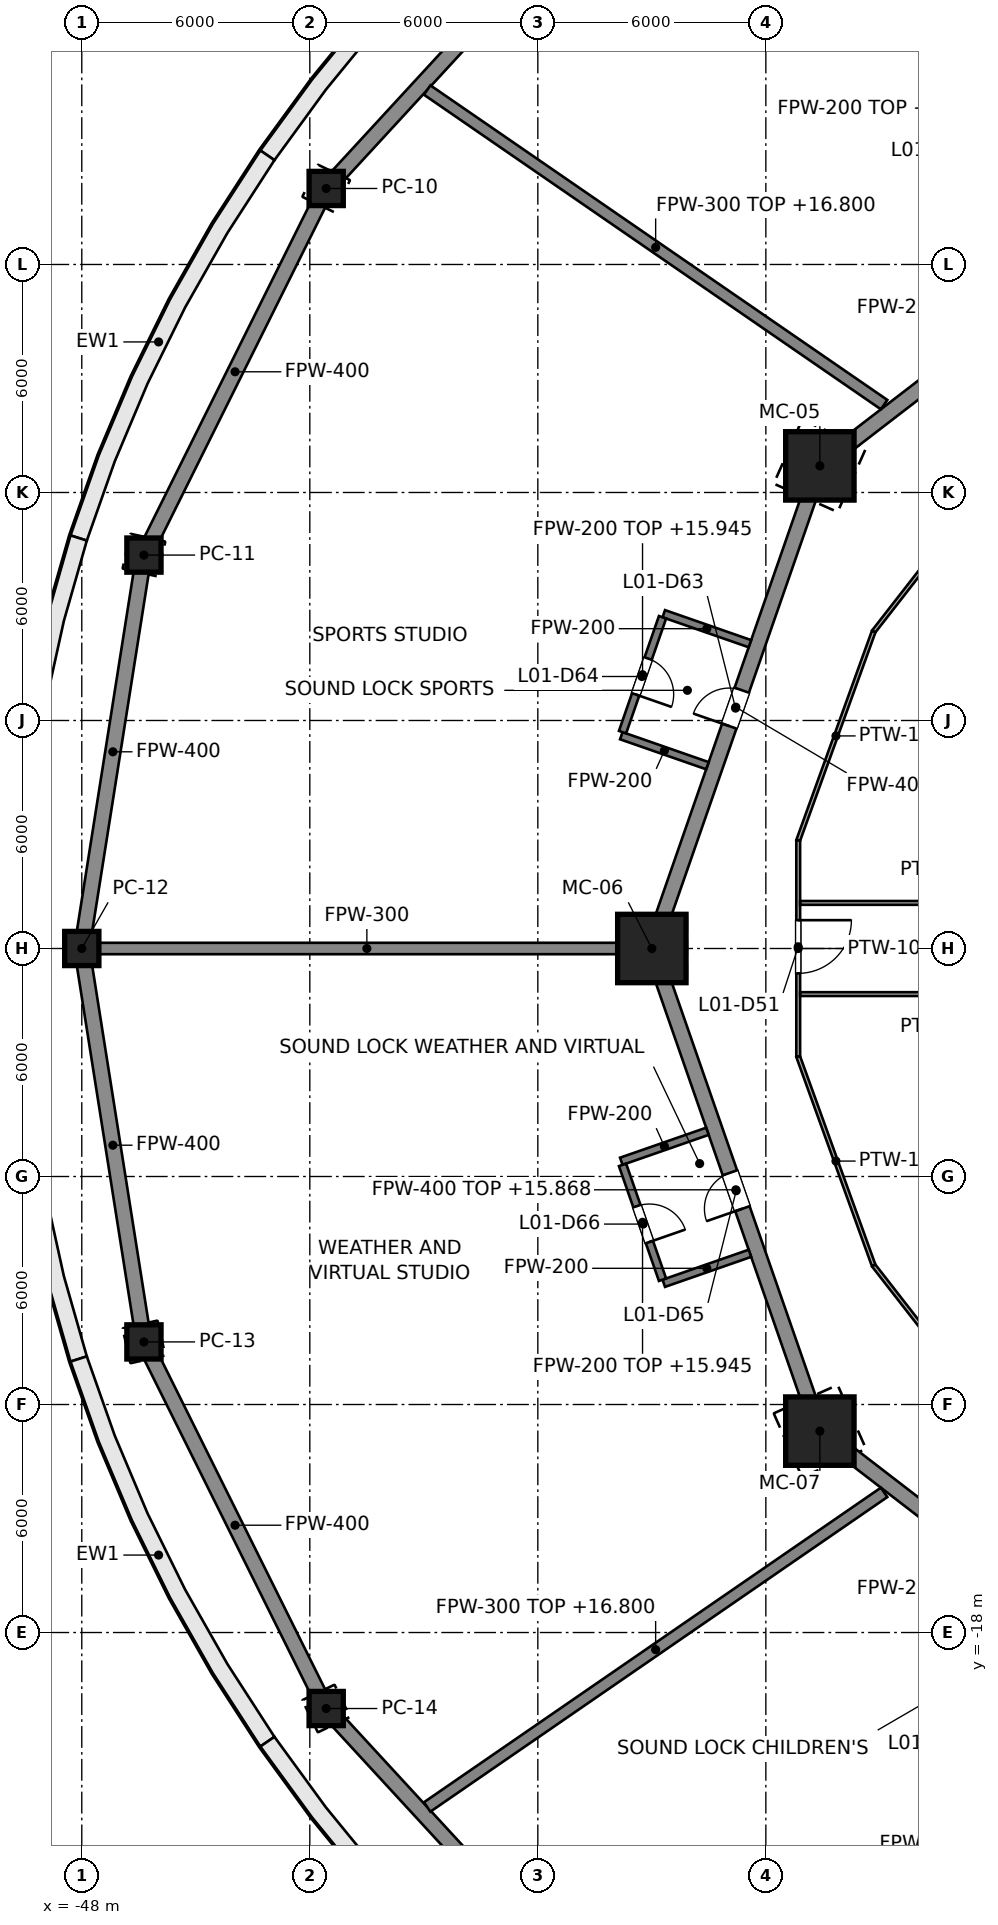
"""IFC4 building model, lengths in metres.
Left out: names, types, materials, properties, quantities, classifications, styles, units other than length and angle.
Written with IfcOpenShell. Run it as: python <this file> out.ifc"""

import sys

from ifc_helpers import new_model, si_unit, direction, frame, frame_2d, origin, origin_2d, place, context, subcontext, project, spatial, polyline, rectangle, hollow_rectangle, outline, extrude, element, fill, save


model = new_model("IFC4")
c1 = context("Model", 3, precision=1e-05, world=origin(), true_north=direction((0.0, 1.0)))
c2 = subcontext(c1, "Body", "Model", "MODEL_VIEW")
j1 = project(units=[si_unit("LENGTHUNIT", "METRE"), si_unit("PLANEANGLEUNIT", "RADIAN")], contexts=[c1])
p1 = place(None, origin())
s1 = spatial("IfcSite", under=j1, at=p1, CompositionType="ELEMENT")
p2 = place(p1, origin())
s2 = spatial("IfcBuilding", under=s1, at=p2, CompositionType="ELEMENT")
p3 = place(p2, frame((0.0, 0.0, 8.0)))
s3 = spatial("IfcBuildingStorey", under=s2, at=p3, CompositionType="ELEMENT", Elevation=8.0)
for number, where, z_axis, x_axis in (
    (1, (-28.579, 12.7, 0.0), (0.0, 0.0, 1.0), (-0.914, 0.406, 0.0)),
    (2, (-33.0, 0.0, 0.0), (0.0, 0.0, 1.0), (-1.0, 0.0, 0.0)),
    (3, (-28.579, -12.7, 0.0), (0.0, 0.0, 1.0), (-0.914, -0.406, 0.0)),
):
    element("IfcColumn", number, at=place(p3, frame(where, z_axis=z_axis, x_axis=x_axis)), inside=s3, PredefinedType="COLUMN", context=c2, shape_type="SweptSolid", body=[
        extrude(hollow_rectangle(XDim=1.8, YDim=1.8, WallThickness=0.08, at=origin_2d()), origin(), (0.0, 0.0, 1.0), 9.0),
    ])
for number, where, z_axis, x_axis in (
    (4, (-41.569, 20.0, 0.0), (0.0, 0.0, 1.0), (-0.901, 0.434, 0.0)),
    (5, (-46.365, 10.353, 0.0), (0.0, 0.0, 1.0), (-0.976, 0.218, 0.0)),
    (6, (-48.0, 0.0, 0.0), (0.0, 0.0, 1.0), (-1.0, 0.0, 0.0)),
    (7, (-46.365, -10.353, 0.0), (0.0, 0.0, 1.0), (-0.976, -0.218, 0.0)),
    (8, (-41.569, -20.0, 0.0), (0.0, 0.0, 1.0), (-0.901, -0.434, 0.0)),
):
    element("IfcColumn", number, at=place(p3, frame(where, z_axis=z_axis, x_axis=x_axis)), inside=s3, PredefinedType="COLUMN", context=c2, shape_type="SweptSolid", body=[
        extrude(hollow_rectangle(XDim=0.9, YDim=0.9, WallThickness=0.04, at=origin_2d()), origin(), (0.0, 0.0, 1.0), 9.0),
    ])
p4 = place(p3, origin())
e9 = element("IfcWall", 9, at=p4, inside=s3, PredefinedType="SOLIDWALL", context=c2, shape_type="SweptSolid", body=[
    extrude(outline(polyline([(-35.355, 29.698), (-37.157, 28.104), (-38.857, 26.431), (-40.451, 24.687), (-41.934, 22.875), (-43.301, 21.0), (-42.93, 20.745), (-41.577, 22.6), (-40.11, 24.393), (-38.533, 26.119), (-36.85, 27.774), (-35.066, 29.354), (-35.355, 29.698)])), origin(), (0.0, 0.0, 1.0), 8.8),
])
e10 = element("IfcWall", 10, at=p4, inside=s3, PredefinedType="SOLIDWALL", context=c2, shape_type="SweptSolid", body=[
    extrude(outline(polyline([(-43.301, 21.0), (-44.55, 19.068), (-45.677, 17.083), (-46.679, 15.052), (-47.553, 12.979), (-48.296, 10.87), (-47.868, 10.734), (-47.133, 12.816), (-46.27, 14.865), (-45.28, 16.872), (-44.166, 18.834), (-42.93, 20.745), (-43.301, 21.0)])), origin(), (0.0, 0.0, 1.0), 8.8),
])
e11 = element("IfcWall", 11, at=p4, inside=s3, PredefinedType="SOLIDWALL", context=c2, shape_type="SweptSolid", body=[
    extrude(outline(polyline([(-48.296, 10.87), (-48.907, 8.732), (-49.385, 6.57), (-49.726, 4.39), (-49.931, 2.198), (-50.0, 0.0), (-49.55, 0.0), (-49.482, 2.17), (-49.28, 4.334), (-48.942, 6.487), (-48.471, 8.622), (-47.868, 10.734), (-48.296, 10.87)])), origin(), (0.0, 0.0, 1.0), 8.8),
])
e12 = element("IfcWall", 12, at=p4, inside=s3, PredefinedType="SOLIDWALL", context=c2, shape_type="SweptSolid", body=[
    extrude(outline(polyline([(-50.0, 0.0), (-49.931, -2.198), (-49.726, -4.39), (-49.385, -6.57), (-48.907, -8.732), (-48.296, -10.87), (-47.868, -10.734), (-48.471, -8.622), (-48.942, -6.487), (-49.28, -4.334), (-49.482, -2.17), (-49.55, 0.0), (-50.0, 0.0)])), origin(), (0.0, 0.0, 1.0), 8.8),
])
e13 = element("IfcWall", 13, at=p4, inside=s3, PredefinedType="SOLIDWALL", context=c2, shape_type="SweptSolid", body=[
    extrude(outline(polyline([(-48.296, -10.87), (-47.553, -12.979), (-46.679, -15.052), (-45.677, -17.083), (-44.55, -19.068), (-43.301, -21.0), (-42.93, -20.745), (-44.166, -18.834), (-45.28, -16.872), (-46.27, -14.865), (-47.133, -12.816), (-47.868, -10.734), (-48.296, -10.87)])), origin(), (0.0, 0.0, 1.0), 8.8),
])
e14 = element("IfcWall", 14, at=p4, inside=s3, PredefinedType="SOLIDWALL", context=c2, shape_type="SweptSolid", body=[
    extrude(outline(polyline([(-43.301, -21.0), (-41.934, -22.875), (-40.451, -24.687), (-38.857, -26.431), (-37.157, -28.104), (-35.355, -29.698), (-35.066, -29.354), (-36.85, -27.774), (-38.533, -26.119), (-40.11, -24.393), (-41.577, -22.6), (-42.93, -20.745), (-43.301, -21.0)])), origin(), (0.0, 0.0, 1.0), 8.8),
])
p5 = place(p3, frame((-33.941, 28.284, 0.0), z_axis=(0.0, 0.0, 1.0), x_axis=(-0.67736833065, -0.735644033914, 0.0)))
e15 = element("IfcWall", 15, at=p5, inside=s3, PredefinedType="PARTITIONING", context=c2, shape_type="SweptSolid", body=[
    extrude(rectangle(XDim=11.261, YDim=0.4, at=frame_2d((5.631, 0.0))), origin(), (0.0, 0.0, 1.0), 7.877),
])
p6 = place(p3, frame((-41.569, 20.0, 0.0), z_axis=(0.0, 0.0, 1.0), x_axis=(-0.445118441463, -0.895471704226, 0.0)))
e16 = element("IfcWall", 16, at=p6, inside=s3, PredefinedType="PARTITIONING", context=c2, shape_type="SweptSolid", body=[
    extrude(rectangle(XDim=10.773, YDim=0.4, at=frame_2d((5.387, 0.0))), origin(), (0.0, 0.0, 1.0), 7.877),
])
for number, where, z_axis, x_axis in (
    (17, (-46.365, 10.353, 0.0), (0.0, 0.0, 1.0), (-0.156, -0.988, 0.0)),
    (18, (-48.0, 0.0, 0.0), (0.0, 0.0, 1.0), (0.156, -0.988, 0.0)),
):
    element("IfcWall", number, at=place(p3, frame(where, z_axis=z_axis, x_axis=x_axis)), inside=s3, PredefinedType="PARTITIONING", context=c2, shape_type="SweptSolid", body=[
        extrude(rectangle(XDim=10.481, YDim=0.4, at=frame_2d((5.241, 0.0))), origin(), (0.0, 0.0, 1.0), 7.877),
    ])
p7 = place(p3, frame((-46.365, -10.353, 0.0), z_axis=(0.0, 0.0, 1.0), x_axis=(0.445118441463, -0.895471704226, 0.0)))
e19 = element("IfcWall", 19, at=p7, inside=s3, PredefinedType="PARTITIONING", context=c2, shape_type="SweptSolid", body=[
    extrude(rectangle(XDim=10.773, YDim=0.4, at=frame_2d((5.387, 0.0))), origin(), (0.0, 0.0, 1.0), 7.877),
])
p8 = place(p3, frame((-41.569, -20.0, 0.0), z_axis=(0.0, 0.0, 1.0), x_axis=(0.67736833065, -0.735644033914, 0.0)))
e20 = element("IfcWall", 20, at=p8, inside=s3, PredefinedType="PARTITIONING", context=c2, shape_type="SweptSolid", body=[
    extrude(rectangle(XDim=11.261, YDim=0.4, at=frame_2d((5.631, 0.0))), origin(), (0.0, 0.0, 1.0), 7.877),
])
p9 = place(p3, frame((-16.5, 21.997, 0.0), z_axis=(0.0, 0.0, 1.0), x_axis=(-0.792443539308, -0.609945273782, 0.0)))
e21 = element("IfcWall", 21, at=p9, inside=s3, PredefinedType="PARTITIONING", context=c2, shape_type="SweptSolid", body=[
    extrude(rectangle(XDim=15.242, YDim=0.4, at=frame_2d((7.621, 0.0))), origin(), (0.0, 0.0, 1.0), 7.868),
])
p10 = place(p9, frame((7.15, 0.0, 0.0)))
e22 = element("IfcOpeningElement", 22, at=p10, cuts=e21, PredefinedType="OPENING", context=c2, shape_type="SweptSolid", body=[
    extrude(rectangle(XDim=1.0, YDim=2.1, at=frame_2d((0.5, 1.05))), frame((0.0, 0.2, 0.0), z_axis=(0.0, -1.0, 0.0), x_axis=(1.0, 0.0, 0.0)), (0.0, 0.0, 1.0), 0.4),
])
p11 = place(p3, frame((-28.579, 12.7, 0.0), z_axis=(0.0, 0.0, 1.0), x_axis=(-0.328770590399, -0.944409815117, 0.0)))
e23 = element("IfcWall", 23, at=p11, inside=s3, PredefinedType="PARTITIONING", context=c2, shape_type="SweptSolid", body=[
    extrude(rectangle(XDim=13.448, YDim=0.4, at=frame_2d((6.724, 0.0))), origin(), (0.0, 0.0, 1.0), 7.868),
])
p12 = place(p11, frame((6.25, 0.0, 0.0)))
e24 = element("IfcOpeningElement", 24, at=p12, cuts=e23, PredefinedType="OPENING", context=c2, shape_type="SweptSolid", body=[
    extrude(rectangle(XDim=1.0, YDim=2.1, at=frame_2d((0.5, 1.05))), frame((0.0, 0.2, 0.0), z_axis=(0.0, -1.0, 0.0), x_axis=(1.0, 0.0, 0.0)), (0.0, 0.0, 1.0), 0.4),
])
p13 = place(p3, frame((-33.0, 0.0, 0.0), z_axis=(0.0, 0.0, 1.0), x_axis=(0.328770590399, -0.944409815117, 0.0)))
e25 = element("IfcWall", 25, at=p13, inside=s3, PredefinedType="PARTITIONING", context=c2, shape_type="SweptSolid", body=[
    extrude(rectangle(XDim=13.448, YDim=0.4, at=frame_2d((6.724, 0.0))), origin(), (0.0, 0.0, 1.0), 7.868),
])
p14 = place(p13, frame((6.25, 0.0, 0.0)))
e26 = element("IfcOpeningElement", 26, at=p14, cuts=e25, PredefinedType="OPENING", context=c2, shape_type="SweptSolid", body=[
    extrude(rectangle(XDim=1.0, YDim=2.1, at=frame_2d((0.5, 1.05))), frame((0.0, 0.2, 0.0), z_axis=(0.0, -1.0, 0.0), x_axis=(1.0, 0.0, 0.0)), (0.0, 0.0, 1.0), 0.4),
])
p15 = place(p3, frame((-28.579, -12.7, 0.0), z_axis=(0.0, 0.0, 1.0), x_axis=(0.792443539308, -0.609945273782, 0.0)))
e27 = element("IfcWall", 27, at=p15, inside=s3, PredefinedType="PARTITIONING", context=c2, shape_type="SweptSolid", body=[
    extrude(rectangle(XDim=15.242, YDim=0.4, at=frame_2d((7.621, 0.0))), origin(), (0.0, 0.0, 1.0), 7.868),
])
p16 = place(p15, frame((7.15, 0.0, 0.0)))
e28 = element("IfcOpeningElement", 28, at=p16, cuts=e27, PredefinedType="OPENING", context=c2, shape_type="SweptSolid", body=[
    extrude(rectangle(XDim=1.0, YDim=2.1, at=frame_2d((0.5, 1.05))), frame((0.0, 0.2, 0.0), z_axis=(0.0, -1.0, 0.0), x_axis=(1.0, 0.0, 0.0)), (0.0, 0.0, 1.0), 0.4),
])
p17 = place(p3, frame((-23.325, 13.271, 0.0), z_axis=(0.0, 0.0, 1.0), x_axis=(-0.614354540541, -0.78903009988, 0.0)))
e29 = element("IfcWall", 29, at=p17, inside=s3, PredefinedType="PARTITIONING", context=c2, shape_type="SweptSolid", body=[
    extrude(rectangle(XDim=6.246, YDim=0.1, at=frame_2d((3.123, 0.0))), origin(), (0.0, 0.0, 1.0), 7.945),
])
p18 = place(p3, frame((-27.162, 8.343, 0.0), z_axis=(0.0, 0.0, 1.0), x_axis=(-0.339837423604, -0.940484197378, 0.0)))
e30 = element("IfcWall", 30, at=p18, inside=s3, PredefinedType="PARTITIONING", context=c2, shape_type="SweptSolid", body=[
    extrude(rectangle(XDim=5.845, YDim=0.1, at=frame_2d((2.922, 0.0))), origin(), (0.0, 0.0, 1.0), 7.877),
])
p19 = place(p3, frame((-29.148, 2.845, 0.0), z_axis=(0.0, 0.0, 1.0), x_axis=(0.0, -1.0, 0.0)))
e31 = element("IfcWall", 31, at=p19, inside=s3, PredefinedType="PARTITIONING", context=c2, shape_type="SweptSolid", body=[
    extrude(rectangle(XDim=5.691, YDim=0.1, at=frame_2d((2.845, 0.0))), origin(), (0.0, 0.0, 1.0), 7.877),
])
p20 = place(p19, frame((2.1, 0.0, 0.0)))
e32 = element("IfcOpeningElement", 32, at=p20, cuts=e31, PredefinedType="OPENING", context=c2, shape_type="SweptSolid", body=[
    extrude(rectangle(XDim=1.4, YDim=2.1, at=frame_2d((0.7, 1.05))), frame((0.0, 0.05, 0.0), z_axis=(0.0, -1.0, 0.0), x_axis=(1.0, 0.0, 0.0)), (0.0, 0.0, 1.0), 0.1),
])
p21 = place(p3, frame((-29.148, -2.845, 0.0), z_axis=(0.0, 0.0, 1.0), x_axis=(0.339837423604, -0.940484197378, 0.0)))
e33 = element("IfcWall", 33, at=p21, inside=s3, PredefinedType="PARTITIONING", context=c2, shape_type="SweptSolid", body=[
    extrude(rectangle(XDim=5.845, YDim=0.1, at=frame_2d((2.922, 0.0))), origin(), (0.0, 0.0, 1.0), 7.877),
])
p22 = place(p3, frame((-27.162, -8.343, 0.0), z_axis=(0.0, 0.0, 1.0), x_axis=(0.614354540541, -0.78903009988, 0.0)))
e34 = element("IfcWall", 34, at=p22, inside=s3, PredefinedType="PARTITIONING", context=c2, shape_type="SweptSolid", body=[
    extrude(rectangle(XDim=6.246, YDim=0.1, at=frame_2d((3.123, 0.0))), origin(), (0.0, 0.0, 1.0), 7.945),
])
for number, where, z_axis, x_axis in (
    (35, (-18.05, -1.2, 0.0), (0.0, 0.0, 1.0), (-1.0, 0.0, 0.0)),
    (36, (-18.05, 1.2, 0.0), (0.0, 0.0, 1.0), (-1.0, 0.0, 0.0)),
):
    element("IfcWall", number, at=place(p3, frame(where, z_axis=z_axis, x_axis=x_axis)), inside=s3, PredefinedType="PARTITIONING", context=c2, shape_type="SweptSolid", body=[
        extrude(rectangle(XDim=11.048, YDim=0.1, at=frame_2d((5.524, 0.0))), origin(), (0.0, 0.0, 1.0), 8.8),
    ])
p23 = place(p3, frame((-26.888, 14.312, 0.0), z_axis=(0.0, 0.0, 1.0), x_axis=(-0.823646474485, 0.567103592889, 0.0)))
e37 = element("IfcWall", 37, at=p23, inside=s3, PredefinedType="PARTITIONING", context=c2, shape_type="SweptSolid", body=[
    extrude(rectangle(XDim=14.598, YDim=0.3, at=frame_2d((7.299, 0.0))), origin(), (0.0, 0.0, 1.0), 8.8),
])
p24 = place(p3, frame((-33.2, 0.0, 0.0), z_axis=(0.0, 0.0, 1.0), x_axis=(-1.0, 0.0, 0.0)))
e38 = element("IfcWall", 38, at=p24, inside=s3, PredefinedType="PARTITIONING", context=c2, shape_type="SweptSolid", body=[
    extrude(rectangle(XDim=14.598, YDim=0.3, at=frame_2d((7.299, 0.0))), origin(), (0.0, 0.0, 1.0), 8.026),
])
p25 = place(p3, frame((-26.888, -14.312, 0.0), z_axis=(0.0, 0.0, 1.0), x_axis=(-0.823646474485, -0.567103592889, 0.0)))
e39 = element("IfcWall", 39, at=p25, inside=s3, PredefinedType="PARTITIONING", context=c2, shape_type="SweptSolid", body=[
    extrude(rectangle(XDim=14.598, YDim=0.3, at=frame_2d((7.299, 0.0))), origin(), (0.0, 0.0, 1.0), 8.8),
])
for number, where, z_axis, x_axis in (
    (40, (-30.419, 8.021, 0.0), (0.0, 0.0, 1.0), (-0.944, 0.329, 0.0)),
    (41, (-31.537, 4.81, 0.0), (0.0, 0.0, 1.0), (-0.944, 0.329, 0.0)),
):
    element("IfcWall", number, at=place(p3, frame(where, z_axis=z_axis, x_axis=x_axis)), inside=s3, PredefinedType="PARTITIONING", context=c2, shape_type="SweptSolid", body=[
        extrude(rectangle(XDim=2.4, YDim=0.2, at=frame_2d((1.2, 0.0))), origin(), (0.0, 0.0, 1.0), 8.8),
    ])
p26 = place(p3, frame((-32.719, 8.716, 0.0), z_axis=(0.0, 0.0, 1.0), x_axis=(-0.328742544754, -0.944419577978, 0.0)))
e42 = element("IfcWall", 42, at=p26, inside=s3, PredefinedType="PARTITIONING", context=c2, shape_type="SweptSolid", body=[
    extrude(rectangle(XDim=3.2, YDim=0.2, at=frame_2d((1.6, 0.0))), origin(), (0.0, 0.0, 1.0), 7.945),
])
p27 = place(p26, frame((1.15, 0.0, 0.0)))
e43 = element("IfcOpeningElement", 43, at=p27, cuts=e42, PredefinedType="OPENING", context=c2, shape_type="SweptSolid", body=[
    extrude(rectangle(XDim=1.0, YDim=2.1, at=frame_2d((0.5, 1.05))), frame((0.0, 0.1, 0.0), z_axis=(0.0, -1.0, 0.0), x_axis=(1.0, 0.0, 0.0)), (0.0, 0.0, 1.0), 0.2),
])
for number, where, z_axis, x_axis in (
    (44, (-31.537, -4.81, 0.0), (0.0, 0.0, 1.0), (-0.944, -0.329, 0.0)),
    (45, (-30.419, -8.021, 0.0), (0.0, 0.0, 1.0), (-0.944, -0.329, 0.0)),
):
    element("IfcWall", number, at=place(p3, frame(where, z_axis=z_axis, x_axis=x_axis)), inside=s3, PredefinedType="PARTITIONING", context=c2, shape_type="SweptSolid", body=[
        extrude(rectangle(XDim=2.4, YDim=0.2, at=frame_2d((1.2, 0.0))), origin(), (0.0, 0.0, 1.0), 8.8),
    ])
p28 = place(p3, frame((-33.771, -5.694, 0.0), z_axis=(0.0, 0.0, 1.0), x_axis=(0.328742544754, -0.944419577978, 0.0)))
e46 = element("IfcWall", 46, at=p28, inside=s3, PredefinedType="PARTITIONING", context=c2, shape_type="SweptSolid", body=[
    extrude(rectangle(XDim=3.2, YDim=0.2, at=frame_2d((1.6, 0.0))), origin(), (0.0, 0.0, 1.0), 7.945),
])
p29 = place(p28, frame((1.15, 0.0, 0.0)))
e47 = element("IfcOpeningElement", 47, at=p29, cuts=e46, PredefinedType="OPENING", context=c2, shape_type="SweptSolid", body=[
    extrude(rectangle(XDim=1.0, YDim=2.1, at=frame_2d((0.5, 1.05))), frame((0.0, 0.1, 0.0), z_axis=(0.0, -1.0, 0.0), x_axis=(1.0, 0.0, 0.0)), (0.0, 0.0, 1.0), 0.2),
])
p30 = place(p20, origin())
e48 = element("IfcDoor", 48, at=p30, inside=s3, OperationType="SINGLE_SWING_LEFT", PredefinedType="DOOR", context=c2, shape_type="SweptSolid", body=[
    extrude(rectangle(XDim=1.4, YDim=2.1, at=frame_2d((0.7, 1.05))), frame((0.0, 0.025, 0.0), z_axis=(0.0, -1.0, 0.0), x_axis=(1.0, 0.0, 0.0)), (0.0, 0.0, 1.0), 0.05),
])
fill(e32, e48)
p31 = place(p12, origin())
e49 = element("IfcDoor", 49, at=p31, inside=s3, OperationType="SINGLE_SWING_RIGHT", PredefinedType="DOOR", context=c2, shape_type="SweptSolid", body=[
    extrude(rectangle(XDim=1.0, YDim=2.1, at=frame_2d((0.5, 1.05))), frame((0.0, 0.025, 0.0), z_axis=(0.0, -1.0, 0.0), x_axis=(1.0, 0.0, 0.0)), (0.0, 0.0, 1.0), 0.05),
])
fill(e24, e49)
p32 = place(p27, origin())
e50 = element("IfcDoor", 50, at=p32, inside=s3, OperationType="SINGLE_SWING_RIGHT", PredefinedType="DOOR", context=c2, shape_type="SweptSolid", body=[
    extrude(rectangle(XDim=1.0, YDim=2.1, at=frame_2d((0.5, 1.05))), frame((0.0, 0.025, 0.0), z_axis=(0.0, -1.0, 0.0), x_axis=(1.0, 0.0, 0.0)), (0.0, 0.0, 1.0), 0.05),
])
fill(e43, e50)
p33 = place(p14, origin())
e51 = element("IfcDoor", 51, at=p33, inside=s3, OperationType="SINGLE_SWING_RIGHT", PredefinedType="DOOR", context=c2, shape_type="SweptSolid", body=[
    extrude(rectangle(XDim=1.0, YDim=2.1, at=frame_2d((0.5, 1.05))), frame((0.0, 0.025, 0.0), z_axis=(0.0, -1.0, 0.0), x_axis=(1.0, 0.0, 0.0)), (0.0, 0.0, 1.0), 0.05),
])
fill(e26, e51)
p34 = place(p29, origin())
e52 = element("IfcDoor", 52, at=p34, inside=s3, OperationType="SINGLE_SWING_RIGHT", PredefinedType="DOOR", context=c2, shape_type="SweptSolid", body=[
    extrude(rectangle(XDim=1.0, YDim=2.1, at=frame_2d((0.5, 1.05))), frame((0.0, 0.025, 0.0), z_axis=(0.0, -1.0, 0.0), x_axis=(1.0, 0.0, 0.0)), (0.0, 0.0, 1.0), 0.05),
])
fill(e47, e52)
save(model, sys.argv[1])
